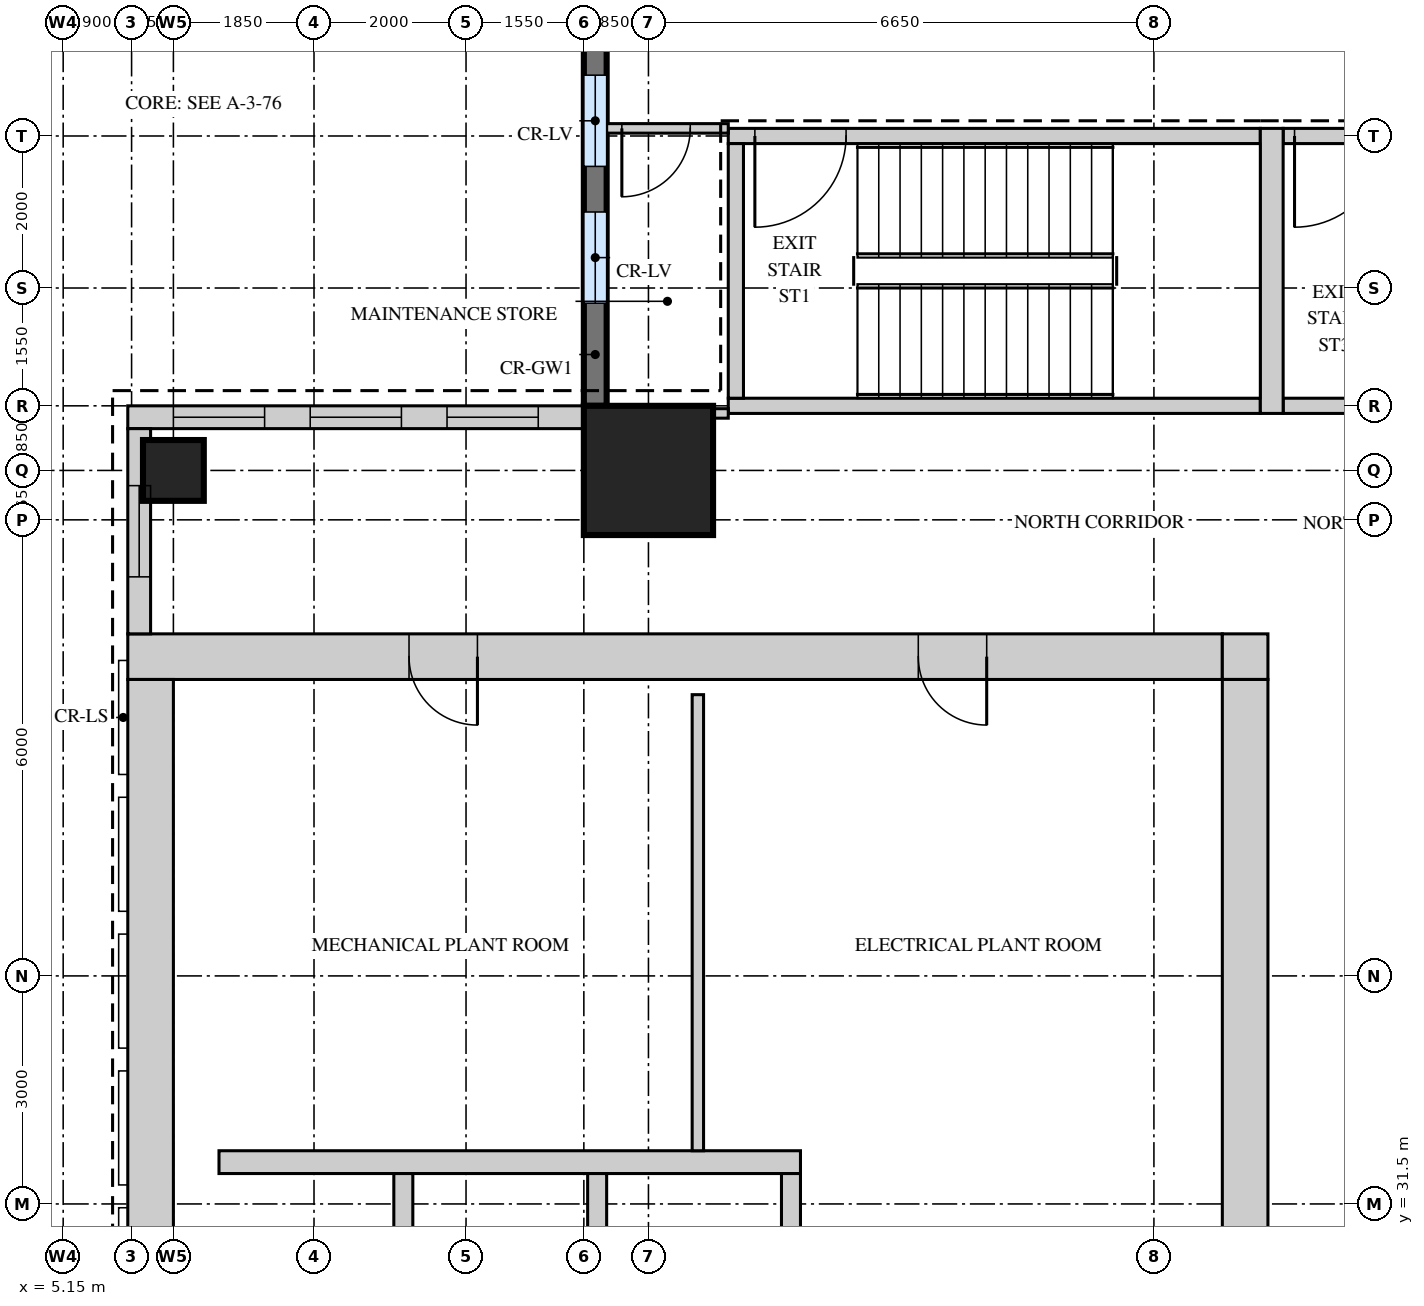
"""IFC4 building model, lengths in metres.
Left out: names, types, materials, properties, quantities, classifications, styles, units other than length and angle.
Written with IfcOpenShell. Run it as: python <this file> out.ifc"""

import sys

from ifc_helpers import new_model, si_unit, direction, frame, frame_2d, origin, origin_2d, place, context, subcontext, project, spatial, rectangle, extrude, source, transform, mapped, element, fill, save


model = new_model("IFC4")
c1 = context("Model", 3, precision=1e-05, world=origin(), true_north=direction((0.0, 1.0)))
c2 = subcontext(c1, "Body", "Model", "MODEL_VIEW")
j1 = project(units=[si_unit("LENGTHUNIT", "METRE"), si_unit("PLANEANGLEUNIT", "RADIAN")], contexts=[c1])
p1 = place(None, origin())
s1 = spatial("IfcSite", under=j1, at=p1, CompositionType="ELEMENT")
p2 = place(p1, origin())
s2 = spatial("IfcBuilding", under=s1, at=p2, CompositionType="ELEMENT")
p3 = place(p2, frame((0.0, 0.0, 330.2)))
s3 = spatial("IfcBuildingStorey", under=s2, at=p3, CompositionType="ELEMENT", Elevation=330.2)
m1 = source(origin(), c2, "Body", "SweptSolid", [
    extrude(rectangle(XDim=14.4, YDim=0.6, at=frame_2d((7.2, 0.0))), origin(), (0.0, 0.0, 1.0), 4.25),
])
p4 = place(p3, frame((6.0, 38.7, 0.0), z_axis=(0.0, 0.0, 1.0), x_axis=(1.0, 0.0, 0.0)))
e1 = element("IfcWall", 1, at=p4, inside=s3, PredefinedType="SHEAR", context=c2, shape_type="MappedRepresentation", body=[
    mapped(m1, transform((0.0, 0.0, 0.0))),
])
m2 = source(origin(), c2, "Body", "SweptSolid", [
    extrude(rectangle(XDim=0.9, YDim=2.1, at=frame_2d((0.45, 1.05))), frame((0.0, 0.31, 0.0), z_axis=(0.0, -1.0, 0.0), x_axis=(1.0, 0.0, 0.0)), (0.0, 0.0, 1.0), 0.62),
])
p5 = place(p4, frame((3.7, 0.0, 0.0)))
e2 = element("IfcOpeningElement", 2, at=p5, cuts=e1, PredefinedType="OPENING", context=c2, shape_type="MappedRepresentation", body=[
    mapped(m2, transform((0.0, 0.0, 0.0))),
])
p6 = place(p4, frame((10.4, 0.0, 0.0)))
e3 = element("IfcOpeningElement", 3, at=p6, cuts=e1, PredefinedType="OPENING", context=c2, shape_type="MappedRepresentation", body=[
    mapped(m2, transform((0.0, 0.0, 0.0))),
])
m3 = source(origin(), c2, "Body", "SweptSolid", [
    extrude(rectangle(XDim=0.6, YDim=0.6, at=frame_2d((0.3, 0.0))), origin(), (0.0, 0.0, 1.0), 4.25),
])
p7 = place(p3, frame((20.4, 38.7, 0.0), z_axis=(0.0, 0.0, 1.0), x_axis=(1.0, 0.0, 0.0)))
e4 = element("IfcWall", 4, at=p7, inside=s3, PredefinedType="SHEAR", context=c2, shape_type="MappedRepresentation", body=[
    mapped(m3, transform((0.0, 0.0, 0.0))),
])
m4 = source(origin(), c2, "Body", "SweptSolid", [
    extrude(rectangle(XDim=22.8, YDim=0.6, at=frame_2d((11.4, 0.0))), origin(), (0.0, 0.0, 1.0), 4.25),
])
p8 = place(p3, frame((20.7, 15.6, 0.0), z_axis=(0.0, 0.0, 1.0), x_axis=(0.0, 1.0, 0.0)))
e5 = element("IfcWall", 5, at=p8, inside=s3, PredefinedType="SHEAR", context=c2, shape_type="MappedRepresentation", body=[
    mapped(m4, transform((0.0, 0.0, 0.0))),
])
p9 = place(p8, frame((11.35, 0.0, 0.0)))
e6 = element("IfcOpeningElement", 6, at=p9, cuts=e5, PredefinedType="OPENING", context=c2, shape_type="MappedRepresentation", body=[
    mapped(m2, transform((0.0, 0.0, 0.0))),
])
p10 = place(p8, frame((1.55, 0.0, 0.0)))
e7 = element("IfcOpeningElement", 7, at=p10, cuts=e5, PredefinedType="OPENING", context=c2, shape_type="MappedRepresentation", body=[
    mapped(m2, transform((0.0, 0.0, 0.0))),
])
p11 = place(p8, frame((5.1, 0.0, 0.0)))
e8 = element("IfcOpeningElement", 8, at=p11, cuts=e5, PredefinedType="OPENING", context=c2, shape_type="MappedRepresentation", body=[
    mapped(m2, transform((0.0, 0.0, 0.0))),
])
p12 = place(p3, frame((6.3, 15.6, 0.0), z_axis=(0.0, 0.0, 1.0), x_axis=(0.0, 1.0, 0.0)))
e9 = element("IfcWall", 9, at=p12, inside=s3, PredefinedType="SHEAR", context=c2, shape_type="MappedRepresentation", body=[
    mapped(m4, transform((0.0, 0.0, 0.0))),
])
m5 = source(origin(), c2, "Body", "SweptSolid", [
    extrude(rectangle(XDim=7.0, YDim=0.2, at=frame_2d((3.5, 0.0))), origin(), (0.0, 0.0, 1.0), 4.25),
])
p13 = place(p3, frame((13.9, 45.55, 0.0), z_axis=(0.0, 0.0, 1.0), x_axis=(1.0, 0.0, 0.0)))
e10 = element("IfcWall", 10, at=p13, inside=s3, PredefinedType="SHEAR", context=c2, shape_type="MappedRepresentation", body=[
    mapped(m5, transform((0.0, 0.0, 0.0))),
])
m6 = source(origin(), c2, "Body", "SweptSolid", [
    extrude(rectangle(XDim=1.2, YDim=2.1, at=frame_2d((0.6, 1.05))), frame((0.0, 0.11, 0.0), z_axis=(0.0, -1.0, 0.0), x_axis=(1.0, 0.0, 0.0)), (0.0, 0.0, 1.0), 0.22),
])
p14 = place(p13, frame((0.35, 0.0, 0.0)))
e11 = element("IfcOpeningElement", 11, at=p14, cuts=e10, PredefinedType="OPENING", context=c2, shape_type="MappedRepresentation", body=[
    mapped(m6, transform((0.0, 0.0, 0.0))),
])
p15 = place(p3, frame((13.9, 42.0, 0.0), z_axis=(0.0, 0.0, 1.0), x_axis=(1.0, 0.0, 0.0)))
e12 = element("IfcWall", 12, at=p15, inside=s3, PredefinedType="SHEAR", context=c2, shape_type="MappedRepresentation", body=[
    mapped(m5, transform((0.0, 0.0, 0.0))),
])
m7 = source(origin(), c2, "Body", "SweptSolid", [
    extrude(rectangle(XDim=7.1, YDim=0.2, at=frame_2d((3.55, 0.0))), origin(), (0.0, 0.0, 1.0), 4.25),
])
p16 = place(p3, frame((21.2, 45.55, 0.0), z_axis=(0.0, 0.0, 1.0), x_axis=(1.0, 0.0, 0.0)))
e13 = element("IfcWall", 13, at=p16, inside=s3, PredefinedType="SHEAR", context=c2, shape_type="MappedRepresentation", body=[
    mapped(m7, transform((0.0, 0.0, 0.0))),
])
p17 = place(p16, frame((0.15, 0.0, 0.0)))
e14 = element("IfcOpeningElement", 14, at=p17, cuts=e13, PredefinedType="OPENING", context=c2, shape_type="MappedRepresentation", body=[
    mapped(m6, transform((0.0, 0.0, 0.0))),
])
p18 = place(p3, frame((21.2, 42.0, 0.0), z_axis=(0.0, 0.0, 1.0), x_axis=(1.0, 0.0, 0.0)))
e15 = element("IfcWall", 15, at=p18, inside=s3, PredefinedType="SHEAR", context=c2, shape_type="MappedRepresentation", body=[
    mapped(m7, transform((0.0, 0.0, 0.0))),
])
m8 = source(origin(), c2, "Body", "SweptSolid", [
    extrude(rectangle(XDim=3.75, YDim=0.3, at=frame_2d((1.875, 0.0))), origin(), (0.0, 0.0, 1.0), 4.25),
])
p19 = place(p3, frame((21.05, 41.9, 0.0), z_axis=(0.0, 0.0, 1.0), x_axis=(0.0, 1.0, 0.0)))
e16 = element("IfcWall", 16, at=p19, inside=s3, PredefinedType="SHEAR", context=c2, shape_type="MappedRepresentation", body=[
    mapped(m8, transform((0.0, 0.0, 0.0))),
])
m9 = source(origin(), c2, "Body", "SweptSolid", [
    extrude(rectangle(XDim=3.35, YDim=0.2, at=frame_2d((1.675, 0.0))), origin(), (0.0, 0.0, 1.0), 4.25),
])
p20 = place(p3, frame((14.0, 42.1, 0.0), z_axis=(0.0, 0.0, 1.0), x_axis=(0.0, 1.0, 0.0)))
e17 = element("IfcWall", 17, at=p20, inside=s3, PredefinedType="SHEAR", context=c2, shape_type="MappedRepresentation", body=[
    mapped(m9, transform((0.0, 0.0, 0.0))),
])
m10 = source(origin(), c2, "Body", "SweptSolid", [
    extrude(rectangle(XDim=7.65, YDim=0.3, at=frame_2d((3.825, 0.0))), origin(), (0.0, 0.0, 1.0), 4.25),
])
p21 = place(p3, frame((7.2, 32.05, 0.0), z_axis=(0.0, 0.0, 1.0), x_axis=(1.0, 0.0, 0.0)))
e18 = element("IfcWall", 18, at=p21, inside=s3, PredefinedType="STANDARD", context=c2, shape_type="MappedRepresentation", body=[
    mapped(m10, transform((0.0, 0.0, 0.0))),
])
m11 = source(origin(), c2, "Body", "SweptSolid", [
    extrude(rectangle(XDim=2.4, YDim=0.25, at=frame_2d((1.2, 0.0))), origin(), (0.0, 0.0, 1.0), 4.25),
])
for number, where, z_axis, x_axis in (
    (19, (9.625, 29.5, 0.0), (0.0, 0.0, 1.0), (0.0, 1.0, 0.0)),
    (20, (12.175, 29.5, 0.0), (0.0, 0.0, 1.0), (0.0, 1.0, 0.0)),
    (21, (14.725, 29.5, 0.0), (0.0, 0.0, 1.0), (0.0, 1.0, 0.0)),
):
    element("IfcWall", number, at=place(p3, frame(where, z_axis=z_axis, x_axis=x_axis)), inside=s3, PredefinedType="STANDARD", context=c2, shape_type="MappedRepresentation", body=[
        mapped(m11, transform((0.0, 0.0, 0.0))),
    ])
m12 = source(origin(), c2, "Body", "SweptSolid", [
    extrude(rectangle(XDim=1.7, YDim=1.7, at=origin_2d()), origin(), (0.0, 0.0, 1.0), 4.5),
])
p22 = place(p3, frame((12.85, 41.15, 0.0), z_axis=(0.0, 0.0, 1.0), x_axis=(1.0, 0.0, 0.0)))
e22 = element("IfcColumn", 22, at=p22, inside=s3, PredefinedType="COLUMN", context=c2, shape_type="MappedRepresentation", body=[
    mapped(m12, transform((0.0, 0.0, 0.0))),
])
m13 = source(origin(), c2, "Body", "SweptSolid", [
    extrude(rectangle(XDim=0.8, YDim=0.8, at=origin_2d()), origin(), (0.0, 0.0, 1.0), 4.5),
])
p23 = place(p3, frame((6.6, 41.15, 0.0), z_axis=(0.0, 0.0, 1.0), x_axis=(1.0, 0.0, 0.0)))
e23 = element("IfcColumn", 23, at=p23, inside=s3, PredefinedType="COLUMN", context=c2, shape_type="MappedRepresentation", body=[
    mapped(m13, transform((0.0, 0.0, 0.0))),
])
m14 = source(origin(), c2, "Body", "SweptSolid", [
    extrude(rectangle(XDim=5.7, YDim=0.3, at=frame_2d((2.85, 0.0))), origin(), (0.0, 0.0, 1.0), 4.5),
])
p24 = place(p3, frame((12.15, 47.7, 0.0), z_axis=(0.0, 0.0, 1.0), x_axis=(0.0, -1.0, 0.0)))
e24 = element("IfcWall", 24, at=p24, inside=s3, PredefinedType="SOLIDWALL", context=c2, shape_type="MappedRepresentation", body=[
    mapped(m14, transform((0.0, 0.0, 0.0))),
])
m15 = source(origin(), c2, "Body", "SweptSolid", [
    extrude(rectangle(XDim=1.2, YDim=2.4, at=frame_2d((0.6, 1.2))), frame((0.0, 0.16, 0.0), z_axis=(0.0, -1.0, 0.0), x_axis=(1.0, 0.0, 0.0)), (0.0, 0.0, 1.0), 0.32),
])
p25 = place(p24, frame((1.35, 0.0, 0.9)))
e25 = element("IfcOpeningElement", 25, at=p25, cuts=e24, PredefinedType="OPENING", context=c2, shape_type="MappedRepresentation", body=[
    mapped(m15, transform((0.0, 0.0, 0.0))),
])
p26 = place(p24, frame((3.15, 0.0, 0.9)))
e26 = element("IfcOpeningElement", 26, at=p26, cuts=e24, PredefinedType="OPENING", context=c2, shape_type="MappedRepresentation", body=[
    mapped(m15, transform((0.0, 0.0, 0.0))),
])
m16 = source(origin(), c2, "Body", "SweptSolid", [
    extrude(rectangle(XDim=6.0, YDim=0.3, at=frame_2d((3.0, 0.0))), origin(), (0.0, 0.0, 1.0), 4.5),
])
p27 = place(p3, frame((12.0, 41.85, 0.0), z_axis=(0.0, 0.0, 1.0), x_axis=(-1.0, 0.0, 0.0)))
e27 = element("IfcWall", 27, at=p27, inside=s3, PredefinedType="SOLIDWALL", context=c2, shape_type="MappedRepresentation", body=[
    mapped(m16, transform((0.0, 0.0, 0.0))),
])
p28 = place(p27, frame((0.6, 0.0, 0.9)))
e28 = element("IfcOpeningElement", 28, at=p28, cuts=e27, PredefinedType="OPENING", context=c2, shape_type="MappedRepresentation", body=[
    mapped(m15, transform((0.0, 0.0, 0.0))),
])
p29 = place(p27, frame((2.4, 0.0, 0.9)))
e29 = element("IfcOpeningElement", 29, at=p29, cuts=e27, PredefinedType="OPENING", context=c2, shape_type="MappedRepresentation", body=[
    mapped(m15, transform((0.0, 0.0, 0.0))),
])
p30 = place(p27, frame((4.2, 0.0, 0.9)))
e30 = element("IfcOpeningElement", 30, at=p30, cuts=e27, PredefinedType="OPENING", context=c2, shape_type="MappedRepresentation", body=[
    mapped(m15, transform((0.0, 0.0, 0.0))),
])
m17 = source(origin(), c2, "Body", "SweptSolid", [
    extrude(rectangle(XDim=2.7, YDim=0.3, at=frame_2d((1.35, 0.0))), origin(), (0.0, 0.0, 1.0), 4.5),
])
p31 = place(p3, frame((6.15, 41.7, 0.0), z_axis=(0.0, 0.0, 1.0), x_axis=(0.0, -1.0, 0.0)))
e31 = element("IfcWall", 31, at=p31, inside=s3, PredefinedType="SOLIDWALL", context=c2, shape_type="MappedRepresentation", body=[
    mapped(m17, transform((0.0, 0.0, 0.0))),
])
p32 = place(p31, frame((0.75, 0.0, 0.9)))
e32 = element("IfcOpeningElement", 32, at=p32, cuts=e31, PredefinedType="OPENING", context=c2, shape_type="MappedRepresentation", body=[
    mapped(m15, transform((0.0, 0.0, 0.0))),
])
m18 = source(origin(), c2, "Body", "SweptSolid", [
    extrude(rectangle(XDim=6.0, YDim=0.15, at=frame_2d((3.0, 0.0))), origin(), (0.0, 0.0, 1.0), 4.3),
])
p33 = place(p3, frame((13.5, 32.2, 0.0), z_axis=(0.0, 0.0, 1.0), x_axis=(0.0, 1.0, 0.0)))
e33 = element("IfcWall", 33, at=p33, inside=s3, PredefinedType="PARTITIONING", context=c2, shape_type="MappedRepresentation", body=[
    mapped(m18, transform((0.0, 0.0, 0.0))),
])
m19 = source(origin(), c2, "Body", "SweptSolid", [
    extrude(rectangle(XDim=1.9, YDim=0.125, at=frame_2d((0.95, 0.0))), origin(), (0.0, 0.0, 1.0), 4.3),
])
p34 = place(p3, frame((12.0, 41.9, 0.0), z_axis=(0.0, 0.0, 1.0), x_axis=(1.0, 0.0, 0.0)))
e34 = element("IfcWall", 34, at=p34, inside=s3, PredefinedType="PARTITIONING", context=c2, shape_type="MappedRepresentation", body=[
    mapped(m19, transform((0.0, 0.0, 0.0))),
])
m20 = source(origin(), c2, "Body", "SweptSolid", [
    extrude(rectangle(XDim=1.6, YDim=0.125, at=frame_2d((0.8, 0.0))), origin(), (0.0, 0.0, 1.0), 4.3),
])
p35 = place(p3, frame((12.3, 45.65, 0.0), z_axis=(0.0, 0.0, 1.0), x_axis=(1.0, 0.0, 0.0)))
e35 = element("IfcWall", 35, at=p35, inside=s3, PredefinedType="PARTITIONING", context=c2, shape_type="MappedRepresentation", body=[
    mapped(m20, transform((0.0, 0.0, 0.0))),
])
m21 = source(origin(), c2, "Body", "SweptSolid", [
    extrude(rectangle(XDim=0.9, YDim=2.1, at=frame_2d((0.45, 1.05))), frame((0.0, 0.073, 0.0), z_axis=(0.0, -1.0, 0.0), x_axis=(1.0, 0.0, 0.0)), (0.0, 0.0, 1.0), 0.145),
])
p36 = place(p35, frame((0.2, 0.0, 0.0)))
e36 = element("IfcOpeningElement", 36, at=p36, cuts=e35, PredefinedType="OPENING", context=c2, shape_type="MappedRepresentation", body=[
    mapped(m21, transform((0.0, 0.0, 0.0))),
])
m22 = source(origin(), c2, "Body", "SweptSolid", [
    extrude(rectangle(XDim=1.2, YDim=2.4, at=frame_2d((0.6, 1.2))), frame((0.0, 0.03, 0.0), z_axis=(0.0, -1.0, 0.0), x_axis=(1.0, 0.0, 0.0)), (0.0, 0.0, 1.0), 0.06),
])
p37 = place(p25, origin())
e37 = element("IfcWindow", 37, at=p37, inside=s3, PartitioningType="SINGLE_PANEL", PredefinedType="WINDOW", context=c2, shape_type="MappedRepresentation", body=[
    mapped(m22, transform((0.0, 0.0, 0.0))),
])
fill(e25, e37)
p38 = place(p26, origin())
e38 = element("IfcWindow", 38, at=p38, inside=s3, PartitioningType="SINGLE_PANEL", PredefinedType="WINDOW", context=c2, shape_type="MappedRepresentation", body=[
    mapped(m22, transform((0.0, 0.0, 0.0))),
])
fill(e26, e38)
p39 = place(p28, origin())
e39 = element("IfcWindow", 39, at=p39, inside=s3, PartitioningType="SINGLE_PANEL", PredefinedType="WINDOW", context=c2, shape_type="MappedRepresentation", body=[
    mapped(m22, transform((0.0, 0.0, 0.0))),
])
fill(e28, e39)
p40 = place(p29, origin())
e40 = element("IfcWindow", 40, at=p40, inside=s3, PartitioningType="SINGLE_PANEL", PredefinedType="WINDOW", context=c2, shape_type="MappedRepresentation", body=[
    mapped(m22, transform((0.0, 0.0, 0.0))),
])
fill(e29, e40)
p41 = place(p30, origin())
e41 = element("IfcWindow", 41, at=p41, inside=s3, PartitioningType="SINGLE_PANEL", PredefinedType="WINDOW", context=c2, shape_type="MappedRepresentation", body=[
    mapped(m22, transform((0.0, 0.0, 0.0))),
])
fill(e30, e41)
p42 = place(p32, origin())
e42 = element("IfcWindow", 42, at=p42, inside=s3, PartitioningType="SINGLE_PANEL", PredefinedType="WINDOW", context=c2, shape_type="MappedRepresentation", body=[
    mapped(m22, transform((0.0, 0.0, 0.0))),
])
fill(e32, e42)
m23 = source(origin(), c2, "Body", "SweptSolid", [
    extrude(rectangle(XDim=0.9, YDim=2.1, at=frame_2d((0.45, 1.05))), frame((0.0, 0.025, 0.0), z_axis=(0.0, -1.0, 0.0), x_axis=(1.0, 0.0, 0.0)), (0.0, 0.0, 1.0), 0.05),
])
p43 = place(p36, origin())
e43 = element("IfcDoor", 43, at=p43, inside=s3, OperationType="SINGLE_SWING_LEFT", PredefinedType="DOOR", context=c2, shape_type="MappedRepresentation", body=[
    mapped(m23, transform((0.0, 0.0, 0.0))),
])
fill(e36, e43)
m24 = source(origin(), c2, "Body", "SweptSolid", [
    extrude(rectangle(XDim=0.9, YDim=2.1, at=frame_2d((0.45, 1.05))), frame((0.0, 0.25, 0.0), z_axis=(0.0, -1.0, 0.0), x_axis=(1.0, 0.0, 0.0)), (0.0, 0.0, 1.0), 0.5),
])
p44 = place(p5, origin())
e44 = element("IfcDoor", 44, at=p44, inside=s3, OperationType="SINGLE_SWING_RIGHT", PredefinedType="DOOR", context=c2, shape_type="MappedRepresentation", body=[
    mapped(m24, transform((0.0, 0.0, 0.0))),
])
fill(e2, e44)
p45 = place(p6, origin())
e45 = element("IfcDoor", 45, at=p45, inside=s3, OperationType="SINGLE_SWING_RIGHT", PredefinedType="DOOR", context=c2, shape_type="MappedRepresentation", body=[
    mapped(m24, transform((0.0, 0.0, 0.0))),
])
fill(e3, e45)
m25 = source(origin(), c2, "Body", "SweptSolid", [
    extrude(rectangle(XDim=1.2, YDim=2.1, at=frame_2d((0.6, 1.05))), frame((0.0, 0.025, 0.0), z_axis=(0.0, -1.0, 0.0), x_axis=(1.0, 0.0, 0.0)), (0.0, 0.0, 1.0), 0.05),
])
p46 = place(p14, origin())
e46 = element("IfcDoor", 46, at=p46, inside=s3, OperationType="SINGLE_SWING_LEFT", PredefinedType="DOOR", context=c2, shape_type="MappedRepresentation", body=[
    mapped(m25, transform((0.0, 0.0, 0.0))),
])
fill(e11, e46)
p47 = place(p17, origin())
e47 = element("IfcDoor", 47, at=p47, inside=s3, OperationType="SINGLE_SWING_LEFT", PredefinedType="DOOR", context=c2, shape_type="MappedRepresentation", body=[
    mapped(m25, transform((0.0, 0.0, 0.0))),
])
fill(e14, e47)
save(model, sys.argv[1])
